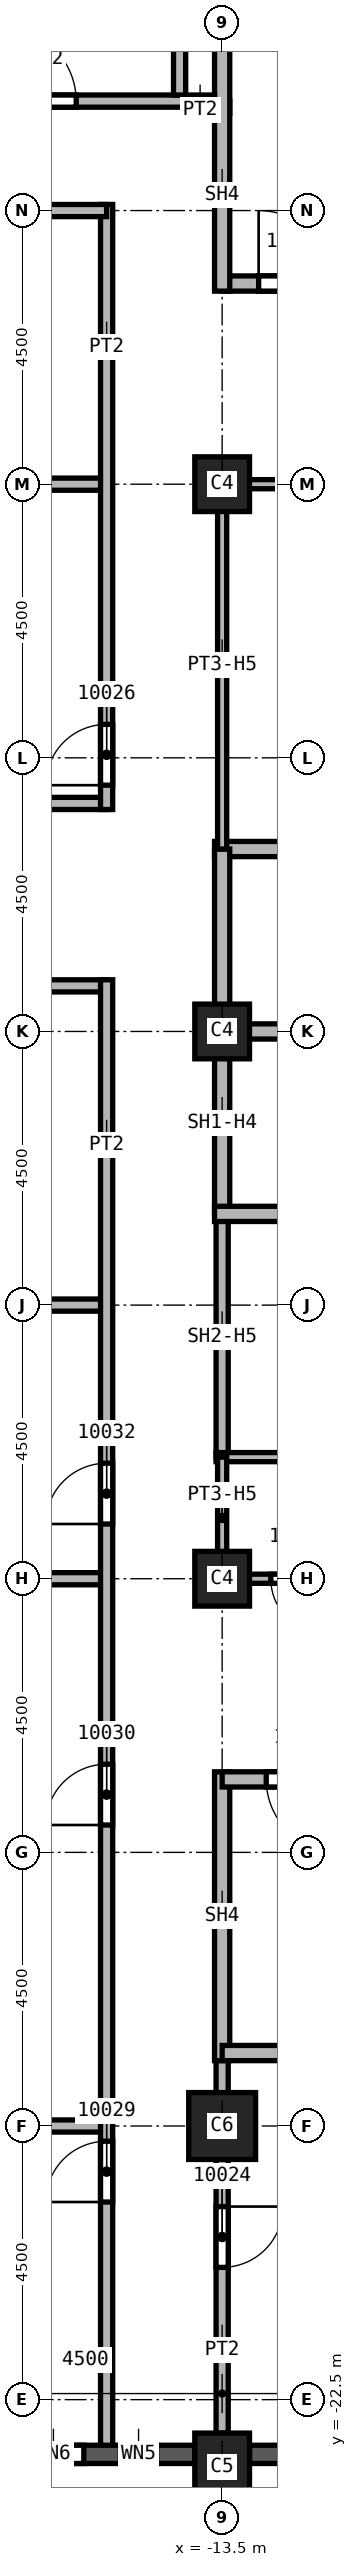
"""IFC4 building model, lengths in metres.
Left out: names, types, materials, properties, quantities, classifications, styles, units other than length and angle.
Written with IfcOpenShell. Run it as: python <this file> out.ifc"""

import sys

from ifc_helpers import new_model, si_unit, direction, frame, frame_2d, origin, origin_2d, place, context, subcontext, project, spatial, rectangle, extrude, element, fill, save


model = new_model("IFC4")
c1 = context("Model", 3, precision=1e-05, world=origin(), true_north=direction((0.0, 1.0)))
c2 = subcontext(c1, "Body", "Model", "MODEL_VIEW")
j1 = project(units=[si_unit("LENGTHUNIT", "METRE"), si_unit("PLANEANGLEUNIT", "RADIAN")], contexts=[c1])
p1 = place(None, origin())
s1 = spatial("IfcSite", under=j1, at=p1, CompositionType="ELEMENT")
p2 = place(p1, origin())
s2 = spatial("IfcBuilding", under=s1, at=p2, CompositionType="ELEMENT")
p3 = place(p2, frame((0.0, 0.0, 170.0)))
s3 = spatial("IfcBuildingStorey", under=s2, at=p3, CompositionType="ELEMENT", Elevation=170.0)
p4 = place(p3, frame((-13.5, -18.0, 0.0), z_axis=(0.0, 0.0, 1.0), x_axis=(1.0, 0.0, 0.0)))
e1 = element("IfcColumn", 1, at=p4, inside=s3, PredefinedType="COLUMN", context=c2, shape_type="SweptSolid", body=[
    extrude(rectangle(XDim=1.1, YDim=1.1, at=origin_2d()), origin(), (0.0, 0.0, 1.0), 3.7),
])
for number, where, z_axis, x_axis in (
    (2, (-13.5, 0.0, 0.0), (0.0, 0.0, 1.0), (1.0, 0.0, 0.0)),
    (3, (-13.5, 9.0, 0.0), (0.0, 0.0, 1.0), (1.0, 0.0, 0.0)),
    (4, (-13.5, -9.0, 0.0), (0.0, 0.0, 1.0), (1.0, 0.0, 0.0)),
):
    element("IfcColumn", number, at=place(p3, frame(where, z_axis=z_axis, x_axis=x_axis)), inside=s3, PredefinedType="COLUMN", context=c2, shape_type="SweptSolid", body=[
        extrude(rectangle(XDim=0.9, YDim=0.9, at=origin_2d()), origin(), (0.0, 0.0, 1.0), 3.7),
    ])
p5 = place(p3, frame((-13.5, -23.6, 0.0), z_axis=(0.0, 0.0, 1.0), x_axis=(1.0, 0.0, 0.0)))
e5 = element("IfcColumn", 5, at=p5, inside=s3, PredefinedType="COLUMN", context=c2, shape_type="SweptSolid", body=[
    extrude(rectangle(XDim=0.9, YDim=1.1, at=origin_2d()), origin(), (0.0, 0.0, 1.0), 3.7),
])
p6 = place(p3, frame((-17.55, -23.4, 0.0), z_axis=(0.0, 0.0, 1.0), x_axis=(1.0, 0.0, 0.0)))
e6 = element("IfcWall", 6, at=p6, inside=s3, PredefinedType="SOLIDWALL", context=c2, shape_type="SweptSolid", body=[
    extrude(rectangle(XDim=3.6, YDim=0.3, at=frame_2d((1.8, 0.0))), origin(), (0.0, 0.0, 1.0), 3.1),
])
p7 = place(p6, frame((0.775, 0.0, 0.8)))
e7 = element("IfcOpeningElement", 7, at=p7, cuts=e6, PredefinedType="OPENING", context=c2, shape_type="SweptSolid", body=[
    extrude(rectangle(XDim=1.0, YDim=1.95, at=frame_2d((0.5, 0.975))), frame((0.0, 0.15, 0.0), z_axis=(0.0, -1.0, 0.0), x_axis=(1.0, 0.0, 0.0)), (0.0, 0.0, 1.0), 0.3),
])
p8 = place(p6, frame((2.375, 0.0, 0.8)))
e8 = element("IfcOpeningElement", 8, at=p8, cuts=e6, PredefinedType="OPENING", context=c2, shape_type="SweptSolid", body=[
    extrude(rectangle(XDim=0.6, YDim=1.95, at=frame_2d((0.3, 0.975))), frame((0.0, 0.15, 0.0), z_axis=(0.0, -1.0, 0.0), x_axis=(1.0, 0.0, 0.0)), (0.0, 0.0, 1.0), 0.3),
])
p9 = place(p3, frame((-13.05, -23.4, 0.0), z_axis=(0.0, 0.0, 1.0), x_axis=(1.0, 0.0, 0.0)))
e9 = element("IfcWall", 9, at=p9, inside=s3, PredefinedType="SOLIDWALL", context=c2, shape_type="SweptSolid", body=[
    extrude(rectangle(XDim=3.6, YDim=0.3, at=frame_2d((1.8, 0.0))), origin(), (0.0, 0.0, 1.0), 3.1),
])
p10 = place(p9, frame((0.6, 0.0, 0.8)))
e10 = element("IfcOpeningElement", 10, at=p10, cuts=e9, PredefinedType="OPENING", context=c2, shape_type="SweptSolid", body=[
    extrude(rectangle(XDim=2.4, YDim=1.95, at=frame_2d((1.2, 0.975))), frame((0.0, 0.15, 0.0), z_axis=(0.0, -1.0, 0.0), x_axis=(1.0, 0.0, 0.0)), (0.0, 0.0, 1.0), 0.3),
])
p11 = place(p3, frame((-33.85, 3.75, 0.0), z_axis=(0.0, 0.0, 1.0), x_axis=(1.0, 0.0, 0.0)))
e11 = element("IfcWall", 11, at=p11, inside=s3, PredefinedType="PARTITIONING", context=c2, shape_type="SweptSolid", body=[
    extrude(rectangle(XDim=18.45, YDim=0.2, at=frame_2d((9.225, 0.0))), origin(), (0.0, 0.0, 1.0), 3.7),
])
p12 = place(p3, frame((-15.4, 0.75, 0.0), z_axis=(0.0, 0.0, 1.0), x_axis=(-1.0, 0.0, 0.0)))
e12 = element("IfcWall", 12, at=p12, inside=s3, PredefinedType="PARTITIONING", context=c2, shape_type="SweptSolid", body=[
    extrude(rectangle(XDim=18.45, YDim=0.2, at=frame_2d((9.225, 0.0))), origin(), (0.0, 0.0, 1.0), 3.7),
])
p13 = place(p12, frame((3.55, 0.0, 0.0)))
e13 = element("IfcOpeningElement", 13, at=p13, cuts=e12, PredefinedType="OPENING", context=c2, shape_type="SweptSolid", body=[
    extrude(rectangle(XDim=1.0, YDim=2.1, at=frame_2d((0.5, 1.05))), frame((0.0, 0.1, 0.0), z_axis=(0.0, -1.0, 0.0), x_axis=(1.0, 0.0, 0.0)), (0.0, 0.0, 1.0), 0.2),
])
p14 = place(p12, frame((12.65, 0.0, 0.0)))
e14 = element("IfcOpeningElement", 14, at=p14, cuts=e12, PredefinedType="OPENING", context=c2, shape_type="SweptSolid", body=[
    extrude(rectangle(XDim=1.0, YDim=2.1, at=frame_2d((0.5, 1.05))), frame((0.0, 0.1, 0.0), z_axis=(0.0, -1.0, 0.0), x_axis=(1.0, 0.0, 0.0)), (0.0, 0.0, 1.0), 0.2),
])
for number, where, z_axis, x_axis in (
    (15, (-27.1, -9.0, 0.0), (0.0, 0.0, 1.0), (1.0, 0.0, 0.0)),
    (16, (-27.1, -4.5, 0.0), (0.0, 0.0, 1.0), (1.0, 0.0, 0.0)),
    (17, (-27.1, 9.0, 0.0), (0.0, 0.0, 1.0), (1.0, 0.0, 0.0)),
):
    element("IfcWall", number, at=place(p3, frame(where, z_axis=z_axis, x_axis=x_axis)), inside=s3, PredefinedType="PARTITIONING", context=c2, shape_type="SweptSolid", body=[
        extrude(rectangle(XDim=11.7, YDim=0.2, at=frame_2d((5.85, 0.0))), origin(), (0.0, 0.0, 1.0), 3.7),
    ])
p15 = place(p3, frame((-24.2, -18.0, 0.0), z_axis=(0.0, 0.0, 1.0), x_axis=(1.0, 0.0, 0.0)))
e18 = element("IfcWall", 18, at=p15, inside=s3, PredefinedType="PARTITIONING", context=c2, shape_type="SweptSolid", body=[
    extrude(rectangle(XDim=8.8, YDim=0.2, at=frame_2d((4.4, 0.0))), origin(), (0.0, 0.0, 1.0), 3.7),
])
p16 = place(p3, frame((-15.4, -23.25, 0.0), z_axis=(0.0, 0.0, 1.0), x_axis=(0.0, 1.0, 0.0)))
e19 = element("IfcWall", 19, at=p16, inside=s3, PredefinedType="PARTITIONING", context=c2, shape_type="SweptSolid", body=[
    extrude(rectangle(XDim=24.1, YDim=0.2, at=frame_2d((12.05, 0.0))), origin(), (0.0, 0.0, 1.0), 3.7),
])
p17 = place(p16, frame((4.0, 0.0, 0.0)))
e20 = element("IfcOpeningElement", 20, at=p17, cuts=e19, PredefinedType="OPENING", context=c2, shape_type="SweptSolid", body=[
    extrude(rectangle(XDim=1.0, YDim=2.1, at=frame_2d((0.5, 1.05))), frame((0.0, 0.1, 0.0), z_axis=(0.0, -1.0, 0.0), x_axis=(1.0, 0.0, 0.0)), (0.0, 0.0, 1.0), 0.2),
])
p18 = place(p16, frame((10.2, 0.0, 0.0)))
e21 = element("IfcOpeningElement", 21, at=p18, cuts=e19, PredefinedType="OPENING", context=c2, shape_type="SweptSolid", body=[
    extrude(rectangle(XDim=1.0, YDim=2.1, at=frame_2d((0.5, 1.05))), frame((0.0, 0.1, 0.0), z_axis=(0.0, -1.0, 0.0), x_axis=(1.0, 0.0, 0.0)), (0.0, 0.0, 1.0), 0.2),
])
p19 = place(p16, frame((15.15, 0.0, 0.0)))
e22 = element("IfcOpeningElement", 22, at=p19, cuts=e19, PredefinedType="OPENING", context=c2, shape_type="SweptSolid", body=[
    extrude(rectangle(XDim=1.0, YDim=2.1, at=frame_2d((0.5, 1.05))), frame((0.0, 0.1, 0.0), z_axis=(0.0, -1.0, 0.0), x_axis=(1.0, 0.0, 0.0)), (0.0, 0.0, 1.0), 0.2),
])
p20 = place(p3, frame((-15.4, 3.65, 0.0), z_axis=(0.0, 0.0, 1.0), x_axis=(0.0, 1.0, 0.0)))
e23 = element("IfcWall", 23, at=p20, inside=s3, PredefinedType="PARTITIONING", context=c2, shape_type="SweptSolid", body=[
    extrude(rectangle(XDim=9.95, YDim=0.2, at=frame_2d((4.975, 0.0))), origin(), (0.0, 0.0, 1.0), 3.7),
])
p21 = place(p20, frame((0.4, 0.0, 0.0)))
e24 = element("IfcOpeningElement", 24, at=p21, cuts=e23, PredefinedType="OPENING", context=c2, shape_type="SweptSolid", body=[
    extrude(rectangle(XDim=1.0, YDim=2.1, at=frame_2d((0.5, 1.05))), frame((0.0, 0.1, 0.0), z_axis=(0.0, -1.0, 0.0), x_axis=(1.0, 0.0, 0.0)), (0.0, 0.0, 1.0), 0.2),
])
p22 = place(p3, frame((-15.4, 13.5, 0.0), z_axis=(0.0, 0.0, 1.0), x_axis=(-1.0, 0.0, 0.0)))
e25 = element("IfcWall", 25, at=p22, inside=s3, PredefinedType="PARTITIONING", context=c2, shape_type="SweptSolid", body=[
    extrude(rectangle(XDim=6.6, YDim=0.2, at=frame_2d((3.3, 0.0))), origin(), (0.0, 0.0, 1.0), 3.7),
])
p23 = place(p22, frame((5.35, 0.0, 0.0)))
e26 = element("IfcOpeningElement", 26, at=p23, cuts=e25, PredefinedType="OPENING", context=c2, shape_type="SweptSolid", body=[
    extrude(rectangle(XDim=1.0, YDim=2.1, at=frame_2d((0.5, 1.05))), frame((0.0, 0.1, 0.0), z_axis=(0.0, -1.0, 0.0), x_axis=(1.0, 0.0, 0.0)), (0.0, 0.0, 1.0), 0.2),
])
p24 = place(p3, frame((-14.1, 15.2, 0.0), z_axis=(0.0, 0.0, 1.0), x_axis=(1.0, 0.0, 0.0)))
e27 = element("IfcWall", 27, at=p24, inside=s3, PredefinedType="PARTITIONING", context=c2, shape_type="SweptSolid", body=[
    extrude(rectangle(XDim=0.725, YDim=0.2, at=frame_2d((0.363, 0.0))), origin(), (0.0, 0.0, 1.0), 3.7),
])
p25 = place(p3, frame((-13.5, -16.675, 0.0), z_axis=(0.0, 0.0, 1.0), x_axis=(0.0, -1.0, 0.0)))
e28 = element("IfcWall", 28, at=p25, inside=s3, PredefinedType="PARTITIONING", context=c2, shape_type="SweptSolid", body=[
    extrude(rectangle(XDim=6.375, YDim=0.2, at=frame_2d((3.188, 0.0))), origin(), (0.0, 0.0, 1.0), 3.7),
])
p26 = place(p25, frame((2.65, 0.0, 0.0)))
e29 = element("IfcOpeningElement", 29, at=p26, cuts=e28, PredefinedType="OPENING", context=c2, shape_type="SweptSolid", body=[
    extrude(rectangle(XDim=1.0, YDim=2.1, at=frame_2d((0.5, 1.05))), frame((0.0, 0.1, 0.0), z_axis=(0.0, -1.0, 0.0), x_axis=(1.0, 0.0, 0.0)), (0.0, 0.0, 1.0), 0.2),
])
p27 = place(p3, frame((-13.5, -7.0, 0.0), z_axis=(0.0, 0.0, 1.0), x_axis=(0.0, 1.0, 0.0)))
e30 = element("IfcWall", 30, at=p27, inside=s3, PredefinedType="SOLIDWALL", context=c2, shape_type="SweptSolid", body=[
    extrude(rectangle(XDim=4.0, YDim=0.2, at=frame_2d((2.0, 0.0))), origin(), (0.0, 0.0, 1.0), 2.938),
])
p28 = place(p3, frame((-13.625, 0.0, 0.0), z_axis=(0.0, 0.0, 1.0), x_axis=(1.0, 0.0, 0.0)))
e31 = element("IfcWall", 31, at=p28, inside=s3, PredefinedType="SOLIDWALL", context=c2, shape_type="SweptSolid", body=[
    extrude(rectangle(XDim=3.125, YDim=0.25, at=frame_2d((1.562, 0.0))), origin(), (0.0, 0.0, 1.0), 3.7),
])
p29 = place(p3, frame((-13.625, 3.0, 0.0), z_axis=(0.0, 0.0, 1.0), x_axis=(1.0, 0.0, 0.0)))
e32 = element("IfcWall", 32, at=p29, inside=s3, PredefinedType="SOLIDWALL", context=c2, shape_type="SweptSolid", body=[
    extrude(rectangle(XDim=6.125, YDim=0.25, at=frame_2d((3.062, 0.0))), origin(), (0.0, 0.0, 1.0), 3.7),
])
p30 = place(p29, frame((3.25, 0.0, 0.0)))
e33 = element("IfcOpeningElement", 33, at=p30, cuts=e32, PredefinedType="OPENING", context=c2, shape_type="SweptSolid", body=[
    extrude(rectangle(XDim=1.1, YDim=2.1, at=frame_2d((0.55, 1.05))), frame((0.0, 0.125, 0.0), z_axis=(0.0, -1.0, 0.0), x_axis=(1.0, 0.0, 0.0)), (0.0, 0.0, 1.0), 0.25),
])
p31 = place(p3, frame((-13.5, -3.0, 0.0), z_axis=(0.0, 0.0, 1.0), x_axis=(0.0, 1.0, 0.0)))
e34 = element("IfcWall", 34, at=p31, inside=s3, PredefinedType="SOLIDWALL", context=c2, shape_type="SweptSolid", body=[
    extrude(rectangle(XDim=6.0, YDim=0.25, at=frame_2d((3.0, 0.0))), origin(), (0.0, 0.0, 1.0), 2.938),
])
p32 = place(p3, frame((-13.625, -3.0, 0.0), z_axis=(0.0, 0.0, 1.0), x_axis=(1.0, 0.0, 0.0)))
e35 = element("IfcWall", 35, at=p32, inside=s3, PredefinedType="SOLIDWALL", context=c2, shape_type="SweptSolid", body=[
    extrude(rectangle(XDim=9.25, YDim=0.25, at=frame_2d((4.625, 0.0))), origin(), (0.0, 0.0, 1.0), 3.7),
])
p33 = place(p32, frame((3.25, 0.0, 0.0)))
e36 = element("IfcOpeningElement", 36, at=p33, cuts=e35, PredefinedType="OPENING", context=c2, shape_type="SweptSolid", body=[
    extrude(rectangle(XDim=1.1, YDim=2.1, at=frame_2d((0.55, 1.05))), frame((0.0, 0.125, 0.0), z_axis=(0.0, -1.0, 0.0), x_axis=(1.0, 0.0, 0.0)), (0.0, 0.0, 1.0), 0.25),
])
p34 = place(p3, frame((-13.5, -12.175, 0.0), z_axis=(0.0, 0.0, 1.0), x_axis=(0.0, -1.0, 0.0)))
e37 = element("IfcWall", 37, at=p34, inside=s3, PredefinedType="SOLIDWALL", context=c2, shape_type="SweptSolid", body=[
    extrude(rectangle(XDim=4.75, YDim=0.25, at=frame_2d((2.375, 0.0))), origin(), (0.0, 0.0, 1.0), 3.7),
])
p35 = place(p3, frame((-13.5, 12.3, 0.0), z_axis=(0.0, 0.0, 1.0), x_axis=(1.0, 0.0, 0.0)))
e38 = element("IfcWall", 38, at=p35, inside=s3, PredefinedType="SOLIDWALL", context=c2, shape_type="SweptSolid", body=[
    extrude(rectangle(XDim=9.125, YDim=0.25, at=frame_2d((4.562, 0.0))), origin(), (0.0, 0.0, 1.0), 3.7),
])
p36 = place(p35, frame((0.6, 0.0, 0.0)))
e39 = element("IfcOpeningElement", 39, at=p36, cuts=e38, PredefinedType="OPENING", context=c2, shape_type="SweptSolid", body=[
    extrude(rectangle(XDim=1.2, YDim=2.1, at=frame_2d((0.6, 1.05))), frame((0.0, 0.125, 0.0), z_axis=(0.0, -1.0, 0.0), x_axis=(1.0, 0.0, 0.0)), (0.0, 0.0, 1.0), 0.25),
])
p37 = place(p3, frame((-13.5, 12.175, 0.0), z_axis=(0.0, 0.0, 1.0), x_axis=(0.0, 1.0, 0.0)))
e40 = element("IfcWall", 40, at=p37, inside=s3, PredefinedType="SOLIDWALL", context=c2, shape_type="SweptSolid", body=[
    extrude(rectangle(XDim=4.75, YDim=0.25, at=frame_2d((2.375, 0.0))), origin(), (0.0, 0.0, 1.0), 3.7),
])
p38 = place(p3, frame((-4.5, -16.8, 0.0), z_axis=(0.0, 0.0, 1.0), x_axis=(-1.0, 0.0, 0.0)))
e41 = element("IfcWall", 41, at=p38, inside=s3, PredefinedType="SOLIDWALL", context=c2, shape_type="SweptSolid", body=[
    extrude(rectangle(XDim=9.0, YDim=0.25, at=frame_2d((4.5, 0.0))), origin(), (0.0, 0.0, 1.0), 3.7),
])
p39 = place(p3, frame((-4.375, -12.3, 0.0), z_axis=(0.0, 0.0, 1.0), x_axis=(-1.0, 0.0, 0.0)))
e42 = element("IfcWall", 42, at=p39, inside=s3, PredefinedType="SOLIDWALL", context=c2, shape_type="SweptSolid", body=[
    extrude(rectangle(XDim=9.125, YDim=0.25, at=frame_2d((4.562, 0.0))), origin(), (0.0, 0.0, 1.0), 3.7),
])
p40 = place(p39, frame((7.2, 0.0, 0.0)))
e43 = element("IfcOpeningElement", 43, at=p40, cuts=e42, PredefinedType="OPENING", context=c2, shape_type="SweptSolid", body=[
    extrude(rectangle(XDim=1.2, YDim=2.1, at=frame_2d((0.6, 1.05))), frame((0.0, 0.125, 0.0), z_axis=(0.0, -1.0, 0.0), x_axis=(1.0, 0.0, 0.0)), (0.0, 0.0, 1.0), 0.25),
])
p41 = place(p3, frame((-13.6, -7.0, 0.0), z_axis=(0.0, 0.0, 1.0), x_axis=(1.0, 0.0, 0.0)))
e44 = element("IfcWall", 44, at=p41, inside=s3, PredefinedType="PARTITIONING", context=c2, shape_type="SweptSolid", body=[
    extrude(rectangle(XDim=3.1, YDim=0.15, at=frame_2d((1.55, 0.0))), origin(), (0.0, 0.0, 1.0), 3.7),
])
p42 = place(p3, frame((-13.5, -9.075, 0.0), z_axis=(0.0, 0.0, 1.0), x_axis=(0.0, 1.0, 0.0)))
e45 = element("IfcWall", 45, at=p42, inside=s3, PredefinedType="PARTITIONING", context=c2, shape_type="SweptSolid", body=[
    extrude(rectangle(XDim=2.075, YDim=0.15, at=frame_2d((1.038, 0.0))), origin(), (0.0, 0.0, 1.0), 2.938),
])
p43 = place(p3, frame((-13.5, 3.0, 0.0), z_axis=(0.0, 0.0, 1.0), x_axis=(0.0, 1.0, 0.0)))
e46 = element("IfcWall", 46, at=p43, inside=s3, PredefinedType="PARTITIONING", context=c2, shape_type="SweptSolid", body=[
    extrude(rectangle(XDim=6.075, YDim=0.15, at=frame_2d((3.038, 0.0))), origin(), (0.0, 0.0, 1.0), 2.938),
])
p44 = place(p3, frame((-13.5, 9.0, 0.0), z_axis=(0.0, 0.0, 1.0), x_axis=(1.0, 0.0, 0.0)))
e47 = element("IfcWall", 47, at=p44, inside=s3, PredefinedType="PARTITIONING", context=c2, shape_type="SweptSolid", body=[
    extrude(rectangle(XDim=3.0, YDim=0.15, at=frame_2d((1.5, 0.0))), origin(), (0.0, 0.0, 1.0), 2.938),
])
p45 = place(p3, frame((-10.5, -9.0, 0.0), z_axis=(0.0, 0.0, 1.0), x_axis=(-1.0, 0.0, 0.0)))
e48 = element("IfcWall", 48, at=p45, inside=s3, PredefinedType="PARTITIONING", context=c2, shape_type="SweptSolid", body=[
    extrude(rectangle(XDim=3.0, YDim=0.15, at=frame_2d((1.5, 0.0))), origin(), (0.0, 0.0, 1.0), 2.938),
])
p46 = place(p45, frame((1.3, 0.0, 0.0)))
e49 = element("IfcOpeningElement", 49, at=p46, cuts=e48, PredefinedType="OPENING", context=c2, shape_type="SweptSolid", body=[
    extrude(rectangle(XDim=0.9, YDim=2.1, at=frame_2d((0.45, 1.05))), frame((0.0, 0.075, 0.0), z_axis=(0.0, -1.0, 0.0), x_axis=(1.0, 0.0, 0.0)), (0.0, 0.0, 1.0), 0.15),
])
p47 = place(p3, frame((-21.9, 15.3, 0.0), z_axis=(0.0, 0.0, 1.0), x_axis=(1.0, 0.0, 0.0)))
e50 = element("IfcWall", 50, at=p47, inside=s3, PredefinedType="SOLIDWALL", context=c2, shape_type="SweptSolid", body=[
    extrude(rectangle(XDim=8.275, YDim=0.2, at=frame_2d((4.137, 0.0))), origin(), (0.0, 0.0, 1.0), 3.7),
])
p48 = place(p47, frame((4.8, 0.0, 0.0)))
e51 = element("IfcOpeningElement", 51, at=p48, cuts=e50, PredefinedType="OPENING", context=c2, shape_type="SweptSolid", body=[
    extrude(rectangle(XDim=1.2, YDim=2.1, at=frame_2d((0.6, 1.05))), frame((0.0, 0.1, 0.0), z_axis=(0.0, -1.0, 0.0), x_axis=(1.0, 0.0, 0.0)), (0.0, 0.0, 1.0), 0.2),
])
p49 = place(p3, frame((-14.2, 15.4, 0.0), z_axis=(0.0, 0.0, 1.0), x_axis=(0.0, 1.0, 0.0)))
e52 = element("IfcWall", 52, at=p49, inside=s3, PredefinedType="SOLIDWALL", context=c2, shape_type="SweptSolid", body=[
    extrude(rectangle(XDim=5.9, YDim=0.2, at=frame_2d((2.95, 0.0))), origin(), (0.0, 0.0, 1.0), 3.7),
])
p50 = place(p46, origin())
e53 = element("IfcDoor", 53, at=p50, inside=s3, OperationType="SINGLE_SWING_RIGHT", PredefinedType="DOOR", context=c2, shape_type="SweptSolid", body=[
    extrude(rectangle(XDim=0.9, YDim=2.1, at=frame_2d((0.45, 1.05))), frame((0.0, 0.025, 0.0), z_axis=(0.0, -1.0, 0.0), x_axis=(1.0, 0.0, 0.0)), (0.0, 0.0, 1.0), 0.05),
])
fill(e49, e53)
p51 = place(p36, origin())
e54 = element("IfcDoor", 54, at=p51, inside=s3, OperationType="SINGLE_SWING_LEFT", PredefinedType="DOOR", context=c2, shape_type="SweptSolid", body=[
    extrude(rectangle(XDim=1.2, YDim=2.1, at=frame_2d((0.6, 1.05))), frame((0.0, 0.025, 0.0), z_axis=(0.0, -1.0, 0.0), x_axis=(1.0, 0.0, 0.0)), (0.0, 0.0, 1.0), 0.05),
])
fill(e39, e54)
p52 = place(p40, origin())
e55 = element("IfcDoor", 55, at=p52, inside=s3, OperationType="SINGLE_SWING_RIGHT", PredefinedType="DOOR", context=c2, shape_type="SweptSolid", body=[
    extrude(rectangle(XDim=1.2, YDim=2.1, at=frame_2d((0.6, 1.05))), frame((0.0, 0.025, 0.0), z_axis=(0.0, -1.0, 0.0), x_axis=(1.0, 0.0, 0.0)), (0.0, 0.0, 1.0), 0.05),
])
fill(e43, e55)
p53 = place(p26, origin())
e56 = element("IfcDoor", 56, at=p53, inside=s3, OperationType="SINGLE_SWING_LEFT", PredefinedType="DOOR", context=c2, shape_type="SweptSolid", body=[
    extrude(rectangle(XDim=1.0, YDim=2.1, at=frame_2d((0.5, 1.05))), frame((0.0, 0.025, 0.0), z_axis=(0.0, -1.0, 0.0), x_axis=(1.0, 0.0, 0.0)), (0.0, 0.0, 1.0), 0.05),
])
fill(e29, e56)
p54 = place(p21, origin())
e57 = element("IfcDoor", 57, at=p54, inside=s3, OperationType="SINGLE_SWING_LEFT", PredefinedType="DOOR", context=c2, shape_type="SweptSolid", body=[
    extrude(rectangle(XDim=1.0, YDim=2.1, at=frame_2d((0.5, 1.05))), frame((0.0, 0.025, 0.0), z_axis=(0.0, -1.0, 0.0), x_axis=(1.0, 0.0, 0.0)), (0.0, 0.0, 1.0), 0.05),
])
fill(e24, e57)
p55 = place(p17, origin())
e58 = element("IfcDoor", 58, at=p55, inside=s3, OperationType="SINGLE_SWING_RIGHT", PredefinedType="DOOR", context=c2, shape_type="SweptSolid", body=[
    extrude(rectangle(XDim=1.0, YDim=2.1, at=frame_2d((0.5, 1.05))), frame((0.0, 0.025, 0.0), z_axis=(0.0, -1.0, 0.0), x_axis=(1.0, 0.0, 0.0)), (0.0, 0.0, 1.0), 0.05),
])
fill(e20, e58)
p56 = place(p18, origin())
e59 = element("IfcDoor", 59, at=p56, inside=s3, OperationType="SINGLE_SWING_LEFT", PredefinedType="DOOR", context=c2, shape_type="SweptSolid", body=[
    extrude(rectangle(XDim=1.0, YDim=2.1, at=frame_2d((0.5, 1.05))), frame((0.0, 0.025, 0.0), z_axis=(0.0, -1.0, 0.0), x_axis=(1.0, 0.0, 0.0)), (0.0, 0.0, 1.0), 0.05),
])
fill(e21, e59)
p57 = place(p19, origin())
e60 = element("IfcDoor", 60, at=p57, inside=s3, OperationType="SINGLE_SWING_LEFT", PredefinedType="DOOR", context=c2, shape_type="SweptSolid", body=[
    extrude(rectangle(XDim=1.0, YDim=2.1, at=frame_2d((0.5, 1.05))), frame((0.0, 0.025, 0.0), z_axis=(0.0, -1.0, 0.0), x_axis=(1.0, 0.0, 0.0)), (0.0, 0.0, 1.0), 0.05),
])
fill(e22, e60)
p58 = place(p48, origin())
e61 = element("IfcDoor", 61, at=p58, inside=s3, OperationType="SINGLE_SWING_RIGHT", PredefinedType="DOOR", context=c2, shape_type="SweptSolid", body=[
    extrude(rectangle(XDim=1.2, YDim=2.1, at=frame_2d((0.6, 1.05))), frame((0.0, 0.025, 0.0), z_axis=(0.0, -1.0, 0.0), x_axis=(1.0, 0.0, 0.0)), (0.0, 0.0, 1.0), 0.05),
])
fill(e51, e61)
p59 = place(p7, origin())
e62 = element("IfcWindow", 62, at=p59, inside=s3, PartitioningType="SINGLE_PANEL", PredefinedType="WINDOW", context=c2, shape_type="SweptSolid", body=[
    extrude(rectangle(XDim=1.0, YDim=1.95, at=frame_2d((0.5, 0.975))), frame((0.0, 0.03, 0.0), z_axis=(0.0, -1.0, 0.0), x_axis=(1.0, 0.0, 0.0)), (0.0, 0.0, 1.0), 0.06),
])
fill(e7, e62)
p60 = place(p8, origin())
e63 = element("IfcWindow", 63, at=p60, inside=s3, PartitioningType="SINGLE_PANEL", PredefinedType="WINDOW", context=c2, shape_type="SweptSolid", body=[
    extrude(rectangle(XDim=0.6, YDim=1.95, at=frame_2d((0.3, 0.975))), frame((0.0, 0.03, 0.0), z_axis=(0.0, -1.0, 0.0), x_axis=(1.0, 0.0, 0.0)), (0.0, 0.0, 1.0), 0.06),
])
fill(e8, e63)
save(model, sys.argv[1])
